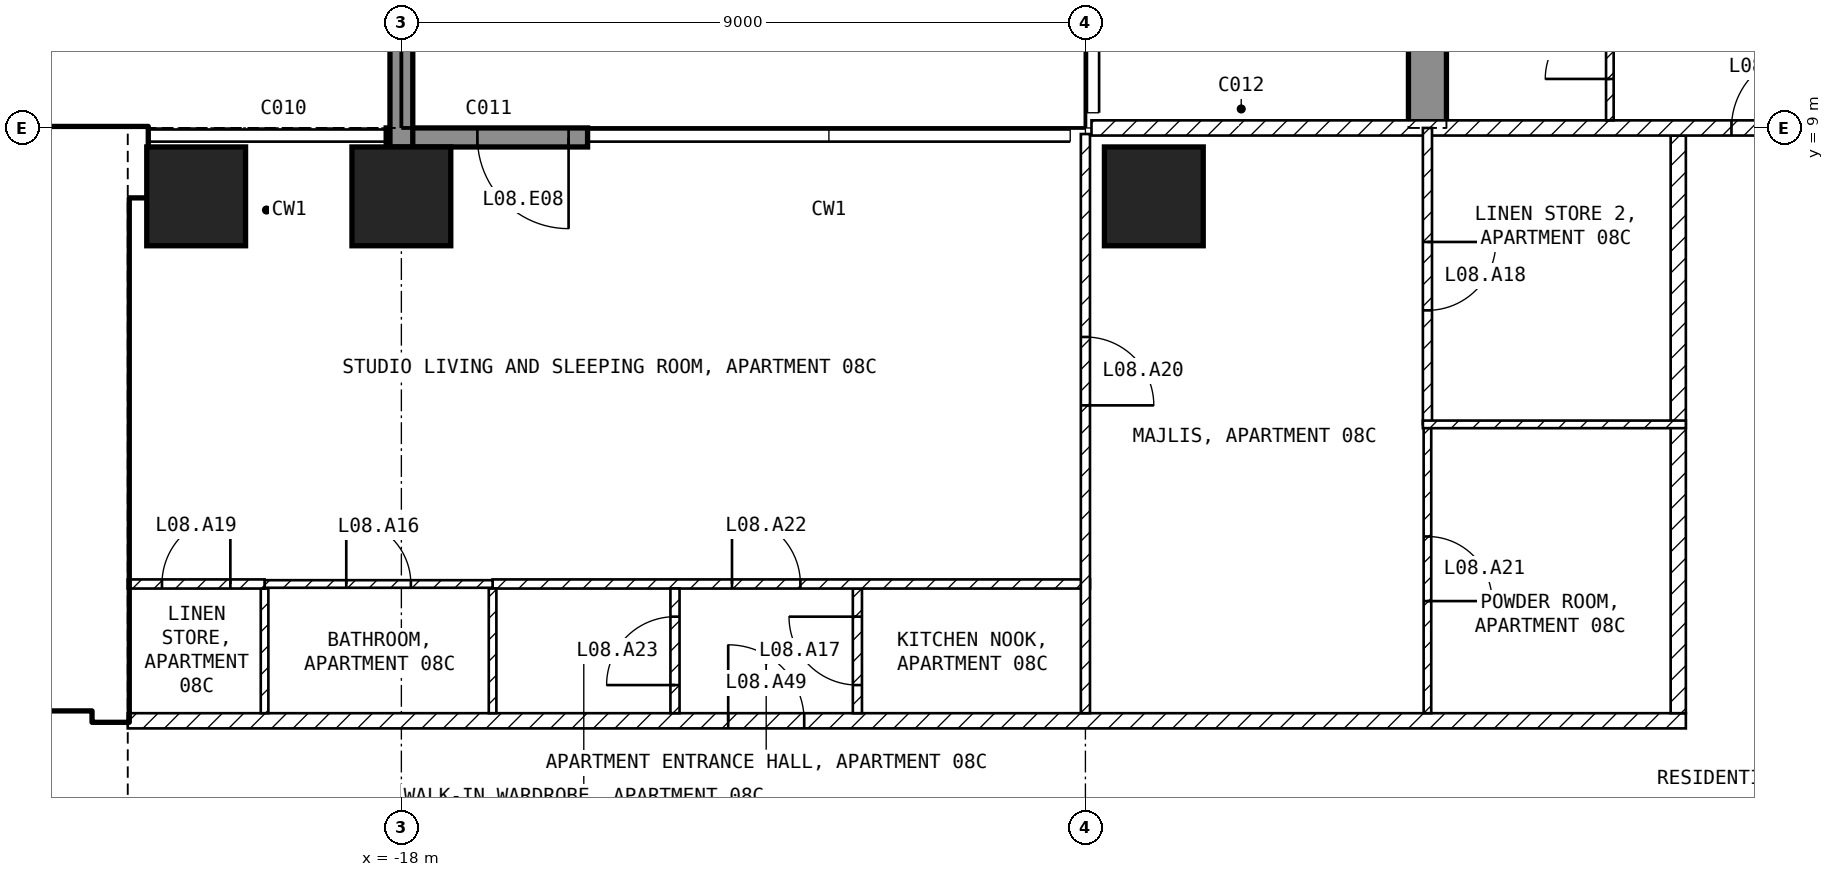
"""IFC4 building model, lengths in metres.
Left out: names, types, materials, properties, quantities, classifications, styles, units other than length and angle.
Written with IfcOpenShell. Run it as: python <this file> out.ifc"""

import sys

from ifc_helpers import new_model, si_unit, direction, frame, frame_2d, origin, origin_2d, place, context, subcontext, project, spatial, polyline, rectangle, outline, extrude, element, fill, save


model = new_model("IFC4")
c1 = context("Model", 3, precision=1e-05, world=origin(), true_north=direction((0.0, 1.0)))
c2 = subcontext(c1, "Body", "Model", "MODEL_VIEW")
j1 = project(units=[si_unit("LENGTHUNIT", "METRE"), si_unit("PLANEANGLEUNIT", "RADIAN")], contexts=[c1])
p1 = place(None, origin())
s1 = spatial("IfcSite", under=j1, at=p1, CompositionType="ELEMENT")
p2 = place(p1, origin())
s2 = spatial("IfcBuilding", under=s1, at=p2, CompositionType="ELEMENT")
p3 = place(p2, frame((0.0, 0.0, 47.0)))
s3 = spatial("IfcBuildingStorey", under=s2, at=p3, CompositionType="ELEMENT", Elevation=47.0)
for number, where, z_axis, x_axis in (
    (1, (-20.7, 8.1, -0.25), (0.0, 0.0, 1.0), (1.0, 0.0, 0.0)),
    (2, (-18.0, 8.1, -0.25), (0.0, 0.0, 1.0), (1.0, 0.0, 0.0)),
    (3, (-8.1, 8.1, -0.25), (0.0, 0.0, 1.0), (1.0, 0.0, 0.0)),
):
    element("IfcColumn", number, at=place(p3, frame(where, z_axis=z_axis, x_axis=x_axis)), inside=s3, PredefinedType="COLUMN", context=c2, shape_type="SweptSolid", body=[
        extrude(rectangle(XDim=1.3, YDim=1.3, at=origin_2d()), origin(), (0.0, 0.0, 1.0), 3.5),
    ])
p4 = place(p3, frame((-4.75, 9.0, -0.25), z_axis=(1.0, 0.0, 0.0), x_axis=(0.0, 1.0, 0.0)))
e4 = element("IfcWall", 4, at=p4, inside=s3, PredefinedType="SHEAR", context=c2, shape_type="SweptSolid", body=[
    extrude(outline(polyline([(0.0, 0.0), (2.1, 0.0), (2.1, 2.65), (4.5, 2.65), (4.5, 0.0), (9.9, 0.0), (9.9, 2.65), (12.3, 2.65), (12.3, 0.0), (16.45, 0.0), (16.45, 3.5), (0.0, 3.5), (0.0, 0.0)])), origin(), (0.0, 0.0, 1.0), 0.5),
])
p5 = place(p3, frame((-15.55, 8.875, 0.0), z_axis=(0.0, 0.0, 1.0), x_axis=(-1.0, 0.0, 0.0)))
e5 = element("IfcWall", 5, at=p5, inside=s3, PredefinedType="SOLIDWALL", context=c2, shape_type="SweptSolid", body=[
    extrude(rectangle(XDim=2.65, YDim=0.25, at=frame_2d((1.325, 0.0))), origin(), (0.0, 0.0, 1.0), 3.25),
])
p6 = place(p5, frame((0.25, 0.0, 0.0)))
e6 = element("IfcOpeningElement", 6, at=p6, cuts=e5, PredefinedType="OPENING", context=c2, shape_type="SweptSolid", body=[
    extrude(rectangle(XDim=1.2, YDim=2.4, at=frame_2d((0.6, 1.2))), frame((0.0, 0.135, 0.0), z_axis=(0.0, -1.0, 0.0), x_axis=(1.0, 0.0, 0.0)), (0.0, 0.0, 1.0), 0.27),
])
p7 = place(p3, frame((-18.0, 8.75, 0.0), z_axis=(0.0, 0.0, 1.0), x_axis=(0.0, 1.0, 0.0)))
e7 = element("IfcWall", 7, at=p7, inside=s3, PredefinedType="SOLIDWALL", context=c2, shape_type="SweptSolid", body=[
    extrude(rectangle(XDim=2.95, YDim=0.3, at=frame_2d((1.475, 0.0))), origin(), (0.0, 0.0, 1.0), 3.25),
])
p8 = place(p3, frame((-31.5, 8.55, 0.0), z_axis=(0.0, 0.0, 1.0), x_axis=(1.0, 0.0, 0.0)))
e8 = element("IfcWall", 8, at=p8, inside=s3, PredefinedType="SHEAR", context=c2, shape_type="SweptSolid", body=[
    extrude(rectangle(XDim=10.15, YDim=0.9, at=frame_2d((5.075, 0.0))), origin(), (0.0, 0.0, 1.0), 3.25),
])
p9 = place(p3, frame((-21.825, 1.2, 0.0), z_axis=(0.0, 0.0, 1.0), x_axis=(0.0, 1.0, 0.0)))
e9 = element("IfcWall", 9, at=p9, inside=s3, PredefinedType="SHEAR", context=c2, shape_type="SweptSolid", body=[
    extrude(rectangle(XDim=6.9, YDim=0.45, at=frame_2d((3.45, 0.0))), origin(), (0.0, 0.0, 1.0), 3.25),
])
p10 = place(p3, frame((-35.1, 1.45, 0.0), z_axis=(0.0, 0.0, 1.0), x_axis=(1.0, 0.0, 0.0)))
e10 = element("IfcWall", 10, at=p10, inside=s3, PredefinedType="SOLIDWALL", context=c2, shape_type="SweptSolid", body=[
    extrude(rectangle(XDim=13.05, YDim=0.2, at=frame_2d((6.525, 0.0))), origin(), (0.0, 0.0, 1.0), 3.25),
])
p11 = place(p10, frame((11.3, 0.0, 0.0)))
e11 = element("IfcOpeningElement", 11, at=p11, cuts=e10, PredefinedType="OPENING", context=c2, shape_type="SweptSolid", body=[
    extrude(rectangle(XDim=1.0, YDim=2.1, at=frame_2d((0.5, 1.05))), frame((0.0, 0.11, 0.0), z_axis=(0.0, -1.0, 0.0), x_axis=(1.0, 0.0, 0.0)), (0.0, 0.0, 1.0), 0.22),
])
p12 = place(p10, frame((8.8, 0.0, 0.0)))
e12 = element("IfcOpeningElement", 12, at=p12, cuts=e10, PredefinedType="OPENING", context=c2, shape_type="SweptSolid", body=[
    extrude(rectangle(XDim=1.0, YDim=2.1, at=frame_2d((0.5, 1.05))), frame((0.0, 0.11, 0.0), z_axis=(0.0, -1.0, 0.0), x_axis=(1.0, 0.0, 0.0)), (0.0, 0.0, 1.0), 0.22),
])
p13 = place(p3, frame((-28.35, 5.15, 0.0), z_axis=(0.0, 0.0, 1.0), x_axis=(1.0, 0.0, 0.0)))
e13 = element("IfcWall", 13, at=p13, inside=s3, PredefinedType="SOLIDWALL", context=c2, shape_type="SweptSolid", body=[
    extrude(rectangle(XDim=6.3, YDim=0.2, at=frame_2d((3.15, 0.0))), origin(), (0.0, 0.0, 1.0), 3.25),
])
p14 = place(p13, frame((5.1, 0.0, 0.0)))
e14 = element("IfcOpeningElement", 14, at=p14, cuts=e13, PredefinedType="OPENING", context=c2, shape_type="SweptSolid", body=[
    extrude(rectangle(XDim=1.0, YDim=2.1, at=frame_2d((0.5, 1.05))), frame((0.0, 0.11, 0.0), z_axis=(0.0, -1.0, 0.0), x_axis=(1.0, 0.0, 0.0)), (0.0, 0.0, 1.0), 0.22),
])
p15 = place(p3, frame((-21.6, 1.2, 0.0), z_axis=(0.0, 0.0, 1.0), x_axis=(1.0, 0.0, 0.0)))
e15 = element("IfcWall", 15, at=p15, inside=s3, PredefinedType="PARTITIONING", context=c2, shape_type="SweptSolid", body=[
    extrude(rectangle(XDim=20.5, YDim=0.2, at=frame_2d((10.25, 0.0))), origin(), (0.0, 0.0, 1.0), 3.25),
])
p16 = place(p15, frame((7.9, 0.0, 0.0)))
e16 = element("IfcOpeningElement", 16, at=p16, cuts=e15, PredefinedType="OPENING", context=c2, shape_type="SweptSolid", body=[
    extrude(rectangle(XDim=1.0, YDim=2.1, at=frame_2d((0.5, 1.05))), frame((0.0, 0.11, 0.0), z_axis=(0.0, -1.0, 0.0), x_axis=(1.0, 0.0, 0.0)), (0.0, 0.0, 1.0), 0.22),
])
p17 = place(p3, frame((-1.2, 1.3, 0.0), z_axis=(0.0, 0.0, 1.0), x_axis=(0.0, 1.0, 0.0)))
e17 = element("IfcWall", 17, at=p17, inside=s3, PredefinedType="PARTITIONING", context=c2, shape_type="SweptSolid", body=[
    extrude(rectangle(XDim=7.6, YDim=0.2, at=frame_2d((3.8, 0.0))), origin(), (0.0, 0.0, 1.0), 3.25),
])
p18 = place(p3, frame((-8.92, 9.0, 0.0), z_axis=(0.0, 0.0, 1.0), x_axis=(1.0, 0.0, 0.0)))
e18 = element("IfcWall", 18, at=p18, inside=s3, PredefinedType="PARTITIONING", context=c2, shape_type="SweptSolid", body=[
    extrude(rectangle(XDim=17.84, YDim=0.2, at=frame_2d((8.92, 0.0))), origin(), (0.0, 0.0, 1.0), 3.25),
])
p19 = place(p18, frame((8.42, 0.0, 0.0)))
e19 = element("IfcOpeningElement", 19, at=p19, cuts=e18, PredefinedType="OPENING", context=c2, shape_type="SweptSolid", body=[
    extrude(rectangle(XDim=1.0, YDim=2.1, at=frame_2d((0.5, 1.05))), frame((0.0, 0.11, 0.0), z_axis=(0.0, -1.0, 0.0), x_axis=(1.0, 0.0, 0.0)), (0.0, 0.0, 1.0), 0.22),
])
p20 = place(p3, frame((-12.0, 1.3, 0.0), z_axis=(0.0, 0.0, 1.0), x_axis=(0.0, 1.0, 0.0)))
e20 = element("IfcWall", 20, at=p20, inside=s3, PredefinedType="PARTITIONING", context=c2, shape_type="SweptSolid", body=[
    extrude(rectangle(XDim=1.64, YDim=0.12, at=frame_2d((0.82, 0.0))), origin(), (0.0, 0.0, 1.0), 3.25),
])
p21 = place(p20, frame((0.37, 0.0, 0.0)))
e21 = element("IfcOpeningElement", 21, at=p21, cuts=e20, PredefinedType="OPENING", context=c2, shape_type="SweptSolid", body=[
    extrude(rectangle(XDim=0.9, YDim=2.1, at=frame_2d((0.45, 1.05))), frame((0.0, 0.07, 0.0), z_axis=(0.0, -1.0, 0.0), x_axis=(1.0, 0.0, 0.0)), (0.0, 0.0, 1.0), 0.14),
])
p22 = place(p3, frame((-16.8, 3.0, 0.0), z_axis=(0.0, 0.0, 1.0), x_axis=(1.0, 0.0, 0.0)))
e22 = element("IfcWall", 22, at=p22, inside=s3, PredefinedType="PARTITIONING", context=c2, shape_type="SweptSolid", body=[
    extrude(rectangle(XDim=7.86, YDim=0.12, at=frame_2d((3.93, 0.0))), origin(), (0.0, 0.0, 1.0), 3.25),
])
p23 = place(p22, frame((3.15, 0.0, 0.0)))
e23 = element("IfcOpeningElement", 23, at=p23, cuts=e22, PredefinedType="OPENING", context=c2, shape_type="SweptSolid", body=[
    extrude(rectangle(XDim=0.9, YDim=2.1, at=frame_2d((0.45, 1.05))), frame((0.0, 0.07, 0.0), z_axis=(0.0, -1.0, 0.0), x_axis=(1.0, 0.0, 0.0)), (0.0, 0.0, 1.0), 0.14),
])
p24 = place(p3, frame((-9.0, 8.92, 0.0), z_axis=(0.0, 0.0, 1.0), x_axis=(0.0, -1.0, 0.0)))
e24 = element("IfcWall", 24, at=p24, inside=s3, PredefinedType="PARTITIONING", context=c2, shape_type="SweptSolid", body=[
    extrude(rectangle(XDim=7.62, YDim=0.12, at=frame_2d((3.81, 0.0))), origin(), (0.0, 0.0, 1.0), 3.25),
])
p25 = place(p24, frame((2.67, 0.0, 0.0)))
e25 = element("IfcOpeningElement", 25, at=p25, cuts=e24, PredefinedType="OPENING", context=c2, shape_type="SweptSolid", body=[
    extrude(rectangle(XDim=0.9, YDim=2.1, at=frame_2d((0.45, 1.05))), frame((0.0, 0.07, 0.0), z_axis=(0.0, -1.0, 0.0), x_axis=(1.0, 0.0, 0.0)), (0.0, 0.0, 1.0), 0.14),
])
p26 = place(p3, frame((-14.4, 1.3, 0.0), z_axis=(0.0, 0.0, 1.0), x_axis=(0.0, 1.0, 0.0)))
e26 = element("IfcWall", 26, at=p26, inside=s3, PredefinedType="PARTITIONING", context=c2, shape_type="SweptSolid", body=[
    extrude(rectangle(XDim=1.64, YDim=0.12, at=frame_2d((0.82, 0.0))), origin(), (0.0, 0.0, 1.0), 3.25),
])
p27 = place(p26, frame((0.37, 0.0, 0.0)))
e27 = element("IfcOpeningElement", 27, at=p27, cuts=e26, PredefinedType="OPENING", context=c2, shape_type="SweptSolid", body=[
    extrude(rectangle(XDim=0.9, YDim=2.1, at=frame_2d((0.45, 1.05))), frame((0.0, 0.07, 0.0), z_axis=(0.0, -1.0, 0.0), x_axis=(1.0, 0.0, 0.0)), (0.0, 0.0, 1.0), 0.14),
])
for number, where, z_axis, x_axis in (
    (28, (-16.8, 1.3, 0.0), (0.0, 0.0, 1.0), (0.0, 1.0, 0.0)),
    (29, (-19.8, 1.3, 0.0), (0.0, 0.0, 1.0), (0.0, 1.0, 0.0)),
):
    element("IfcWall", number, at=place(p3, frame(where, z_axis=z_axis, x_axis=x_axis)), inside=s3, PredefinedType="PARTITIONING", context=c2, shape_type="SweptSolid", body=[
        extrude(rectangle(XDim=1.64, YDim=0.1, at=frame_2d((0.82, 0.0))), origin(), (0.0, 0.0, 1.0), 3.25),
    ])
p28 = place(p3, frame((-19.8, 3.0, 0.0), z_axis=(0.0, 0.0, 1.0), x_axis=(1.0, 0.0, 0.0)))
e30 = element("IfcWall", 30, at=p28, inside=s3, PredefinedType="PARTITIONING", context=c2, shape_type="SweptSolid", body=[
    extrude(rectangle(XDim=3.0, YDim=0.1, at=frame_2d((1.5, 0.0))), origin(), (0.0, 0.0, 1.0), 3.25),
])
p29 = place(p28, frame((1.075, 0.0, 0.0)))
e31 = element("IfcOpeningElement", 31, at=p29, cuts=e30, PredefinedType="OPENING", context=c2, shape_type="SweptSolid", body=[
    extrude(rectangle(XDim=0.85, YDim=2.1, at=frame_2d((0.425, 1.05))), frame((0.0, 0.06, 0.0), z_axis=(0.0, -1.0, 0.0), x_axis=(1.0, 0.0, 0.0)), (0.0, 0.0, 1.0), 0.12),
])
p30 = place(p3, frame((-21.6, 3.0, 0.0), z_axis=(0.0, 0.0, 1.0), x_axis=(1.0, 0.0, 0.0)))
e32 = element("IfcWall", 32, at=p30, inside=s3, PredefinedType="PARTITIONING", context=c2, shape_type="SweptSolid", body=[
    extrude(rectangle(XDim=1.8, YDim=0.12, at=frame_2d((0.9, 0.0))), origin(), (0.0, 0.0, 1.0), 3.25),
])
p31 = place(p30, frame((0.45, 0.0, 0.0)))
e33 = element("IfcOpeningElement", 33, at=p31, cuts=e32, PredefinedType="OPENING", context=c2, shape_type="SweptSolid", body=[
    extrude(rectangle(XDim=0.9, YDim=2.1, at=frame_2d((0.45, 1.05))), frame((0.0, 0.07, 0.0), z_axis=(0.0, -1.0, 0.0), x_axis=(1.0, 0.0, 0.0)), (0.0, 0.0, 1.0), 0.14),
])
p32 = place(p3, frame((-4.5, 5.1, 0.0), z_axis=(0.0, 0.0, 1.0), x_axis=(0.0, -1.0, 0.0)))
e34 = element("IfcWall", 34, at=p32, inside=s3, PredefinedType="PARTITIONING", context=c2, shape_type="SweptSolid", body=[
    extrude(rectangle(XDim=3.8, YDim=0.1, at=frame_2d((1.9, 0.0))), origin(), (0.0, 0.0, 1.0), 3.25),
])
p33 = place(p32, frame((1.475, 0.0, 0.0)))
e35 = element("IfcOpeningElement", 35, at=p33, cuts=e34, PredefinedType="OPENING", context=c2, shape_type="SweptSolid", body=[
    extrude(rectangle(XDim=0.85, YDim=2.1, at=frame_2d((0.425, 1.05))), frame((0.0, 0.06, 0.0), z_axis=(0.0, -1.0, 0.0), x_axis=(1.0, 0.0, 0.0)), (0.0, 0.0, 1.0), 0.12),
])
p34 = place(p3, frame((-4.5, 9.0, 0.0), z_axis=(0.0, 0.0, 1.0), x_axis=(0.0, -1.0, 0.0)))
e36 = element("IfcWall", 36, at=p34, inside=s3, PredefinedType="PARTITIONING", context=c2, shape_type="SweptSolid", body=[
    extrude(rectangle(XDim=3.9, YDim=0.12, at=frame_2d((1.95, 0.0))), origin(), (0.0, 0.0, 1.0), 3.25),
])
p35 = place(p34, frame((1.5, 0.0, 0.0)))
e37 = element("IfcOpeningElement", 37, at=p35, cuts=e36, PredefinedType="OPENING", context=c2, shape_type="SweptSolid", body=[
    extrude(rectangle(XDim=0.9, YDim=2.1, at=frame_2d((0.45, 1.05))), frame((0.0, 0.07, 0.0), z_axis=(0.0, -1.0, 0.0), x_axis=(1.0, 0.0, 0.0)), (0.0, 0.0, 1.0), 0.14),
])
p36 = place(p3, frame((-4.56, 5.1, 0.0), z_axis=(0.0, 0.0, 1.0), x_axis=(1.0, 0.0, 0.0)))
e38 = element("IfcWall", 38, at=p36, inside=s3, PredefinedType="PARTITIONING", context=c2, shape_type="SweptSolid", body=[
    extrude(rectangle(XDim=3.46, YDim=0.1, at=frame_2d((1.73, 0.0))), origin(), (0.0, 0.0, 1.0), 3.25),
])
p37 = place(p3, frame((-2.1, 9.1, 0.0), z_axis=(0.0, 0.0, 1.0), x_axis=(0.0, 1.0, 0.0)))
e39 = element("IfcWall", 39, at=p37, inside=s3, PredefinedType="PARTITIONING", context=c2, shape_type="SweptSolid", body=[
    extrude(rectangle(XDim=1.94, YDim=0.1, at=frame_2d((0.97, 0.0))), origin(), (0.0, 0.0, 1.0), 3.25),
])
p38 = place(p37, frame((0.545, 0.0, 0.0)))
e40 = element("IfcOpeningElement", 40, at=p38, cuts=e39, PredefinedType="OPENING", context=c2, shape_type="SweptSolid", body=[
    extrude(rectangle(XDim=0.85, YDim=2.1, at=frame_2d((0.425, 1.05))), frame((0.0, 0.06, 0.0), z_axis=(0.0, -1.0, 0.0), x_axis=(1.0, 0.0, 0.0)), (0.0, 0.0, 1.0), 0.12),
])
p39 = place(p6, origin())
e41 = element("IfcDoor", 41, at=p39, inside=s3, OperationType="SINGLE_SWING_LEFT", PredefinedType="DOOR", context=c2, shape_type="SweptSolid", body=[
    extrude(rectangle(XDim=1.2, YDim=2.4, at=frame_2d((0.6, 1.2))), frame((0.0, 0.025, 0.0), z_axis=(0.0, -1.0, 0.0), x_axis=(1.0, 0.0, 0.0)), (0.0, 0.0, 1.0), 0.05),
])
fill(e6, e41)
p40 = place(p14, origin())
e42 = element("IfcDoor", 42, at=p40, inside=s3, OperationType="SINGLE_SWING_LEFT", PredefinedType="DOOR", context=c2, shape_type="SweptSolid", body=[
    extrude(rectangle(XDim=1.0, YDim=2.1, at=frame_2d((0.5, 1.05))), frame((0.0, 0.025, 0.0), z_axis=(0.0, -1.0, 0.0), x_axis=(1.0, 0.0, 0.0)), (0.0, 0.0, 1.0), 0.05),
])
fill(e14, e42)
p41 = place(p29, origin())
e43 = element("IfcDoor", 43, at=p41, inside=s3, OperationType="SINGLE_SWING_LEFT", PredefinedType="DOOR", context=c2, shape_type="SweptSolid", body=[
    extrude(rectangle(XDim=0.85, YDim=2.1, at=frame_2d((0.425, 1.05))), frame((0.0, 0.025, 0.0), z_axis=(0.0, -1.0, 0.0), x_axis=(1.0, 0.0, 0.0)), (0.0, 0.0, 1.0), 0.05),
])
fill(e31, e43)
p42 = place(p21, origin())
e44 = element("IfcDoor", 44, at=p42, inside=s3, OperationType="SINGLE_SWING_RIGHT", PredefinedType="DOOR", context=c2, shape_type="SweptSolid", body=[
    extrude(rectangle(XDim=0.9, YDim=2.1, at=frame_2d((0.45, 1.05))), frame((0.0, 0.025, 0.0), z_axis=(0.0, -1.0, 0.0), x_axis=(1.0, 0.0, 0.0)), (0.0, 0.0, 1.0), 0.05),
])
fill(e21, e44)
p43 = place(p35, origin())
e45 = element("IfcDoor", 45, at=p43, inside=s3, OperationType="SINGLE_SWING_LEFT", PredefinedType="DOOR", context=c2, shape_type="SweptSolid", body=[
    extrude(rectangle(XDim=0.9, YDim=2.1, at=frame_2d((0.45, 1.05))), frame((0.0, 0.025, 0.0), z_axis=(0.0, -1.0, 0.0), x_axis=(1.0, 0.0, 0.0)), (0.0, 0.0, 1.0), 0.05),
])
fill(e37, e45)
p44 = place(p31, origin())
e46 = element("IfcDoor", 46, at=p44, inside=s3, OperationType="SINGLE_SWING_RIGHT", PredefinedType="DOOR", context=c2, shape_type="SweptSolid", body=[
    extrude(rectangle(XDim=0.9, YDim=2.1, at=frame_2d((0.45, 1.05))), frame((0.0, 0.025, 0.0), z_axis=(0.0, -1.0, 0.0), x_axis=(1.0, 0.0, 0.0)), (0.0, 0.0, 1.0), 0.05),
])
fill(e33, e46)
p45 = place(p25, origin())
e47 = element("IfcDoor", 47, at=p45, inside=s3, OperationType="SINGLE_SWING_RIGHT", PredefinedType="DOOR", context=c2, shape_type="SweptSolid", body=[
    extrude(rectangle(XDim=0.9, YDim=2.1, at=frame_2d((0.45, 1.05))), frame((0.0, 0.025, 0.0), z_axis=(0.0, -1.0, 0.0), x_axis=(1.0, 0.0, 0.0)), (0.0, 0.0, 1.0), 0.05),
])
fill(e25, e47)
p46 = place(p33, origin())
e48 = element("IfcDoor", 48, at=p46, inside=s3, OperationType="SINGLE_SWING_RIGHT", PredefinedType="DOOR", context=c2, shape_type="SweptSolid", body=[
    extrude(rectangle(XDim=0.85, YDim=2.1, at=frame_2d((0.425, 1.05))), frame((0.0, 0.025, 0.0), z_axis=(0.0, -1.0, 0.0), x_axis=(1.0, 0.0, 0.0)), (0.0, 0.0, 1.0), 0.05),
])
fill(e35, e48)
p47 = place(p23, origin())
e49 = element("IfcDoor", 49, at=p47, inside=s3, OperationType="SINGLE_SWING_LEFT", PredefinedType="DOOR", context=c2, shape_type="SweptSolid", body=[
    extrude(rectangle(XDim=0.9, YDim=2.1, at=frame_2d((0.45, 1.05))), frame((0.0, 0.025, 0.0), z_axis=(0.0, -1.0, 0.0), x_axis=(1.0, 0.0, 0.0)), (0.0, 0.0, 1.0), 0.05),
])
fill(e23, e49)
p48 = place(p27, origin())
e50 = element("IfcDoor", 50, at=p48, inside=s3, OperationType="SINGLE_SWING_LEFT", PredefinedType="DOOR", context=c2, shape_type="SweptSolid", body=[
    extrude(rectangle(XDim=0.9, YDim=2.1, at=frame_2d((0.45, 1.05))), frame((0.0, 0.025, 0.0), z_axis=(0.0, -1.0, 0.0), x_axis=(1.0, 0.0, 0.0)), (0.0, 0.0, 1.0), 0.05),
])
fill(e27, e50)
p49 = place(p19, origin())
e51 = element("IfcDoor", 51, at=p49, inside=s3, OperationType="SINGLE_SWING_RIGHT", PredefinedType="DOOR", context=c2, shape_type="SweptSolid", body=[
    extrude(rectangle(XDim=1.0, YDim=2.1, at=frame_2d((0.5, 1.05))), frame((0.0, 0.025, 0.0), z_axis=(0.0, -1.0, 0.0), x_axis=(1.0, 0.0, 0.0)), (0.0, 0.0, 1.0), 0.05),
])
fill(e19, e51)
p50 = place(p38, origin())
e52 = element("IfcDoor", 52, at=p50, inside=s3, OperationType="SINGLE_SWING_LEFT", PredefinedType="DOOR", context=c2, shape_type="SweptSolid", body=[
    extrude(rectangle(XDim=0.85, YDim=2.1, at=frame_2d((0.425, 1.05))), frame((0.0, 0.025, 0.0), z_axis=(0.0, -1.0, 0.0), x_axis=(1.0, 0.0, 0.0)), (0.0, 0.0, 1.0), 0.05),
])
fill(e40, e52)
p51 = place(p16, origin())
e53 = element("IfcDoor", 53, at=p51, inside=s3, OperationType="SINGLE_SWING_LEFT", PredefinedType="DOOR", context=c2, shape_type="SweptSolid", body=[
    extrude(rectangle(XDim=1.0, YDim=2.1, at=frame_2d((0.5, 1.05))), frame((0.0, 0.025, 0.0), z_axis=(0.0, -1.0, 0.0), x_axis=(1.0, 0.0, 0.0)), (0.0, 0.0, 1.0), 0.05),
])
fill(e16, e53)
save(model, sys.argv[1])
